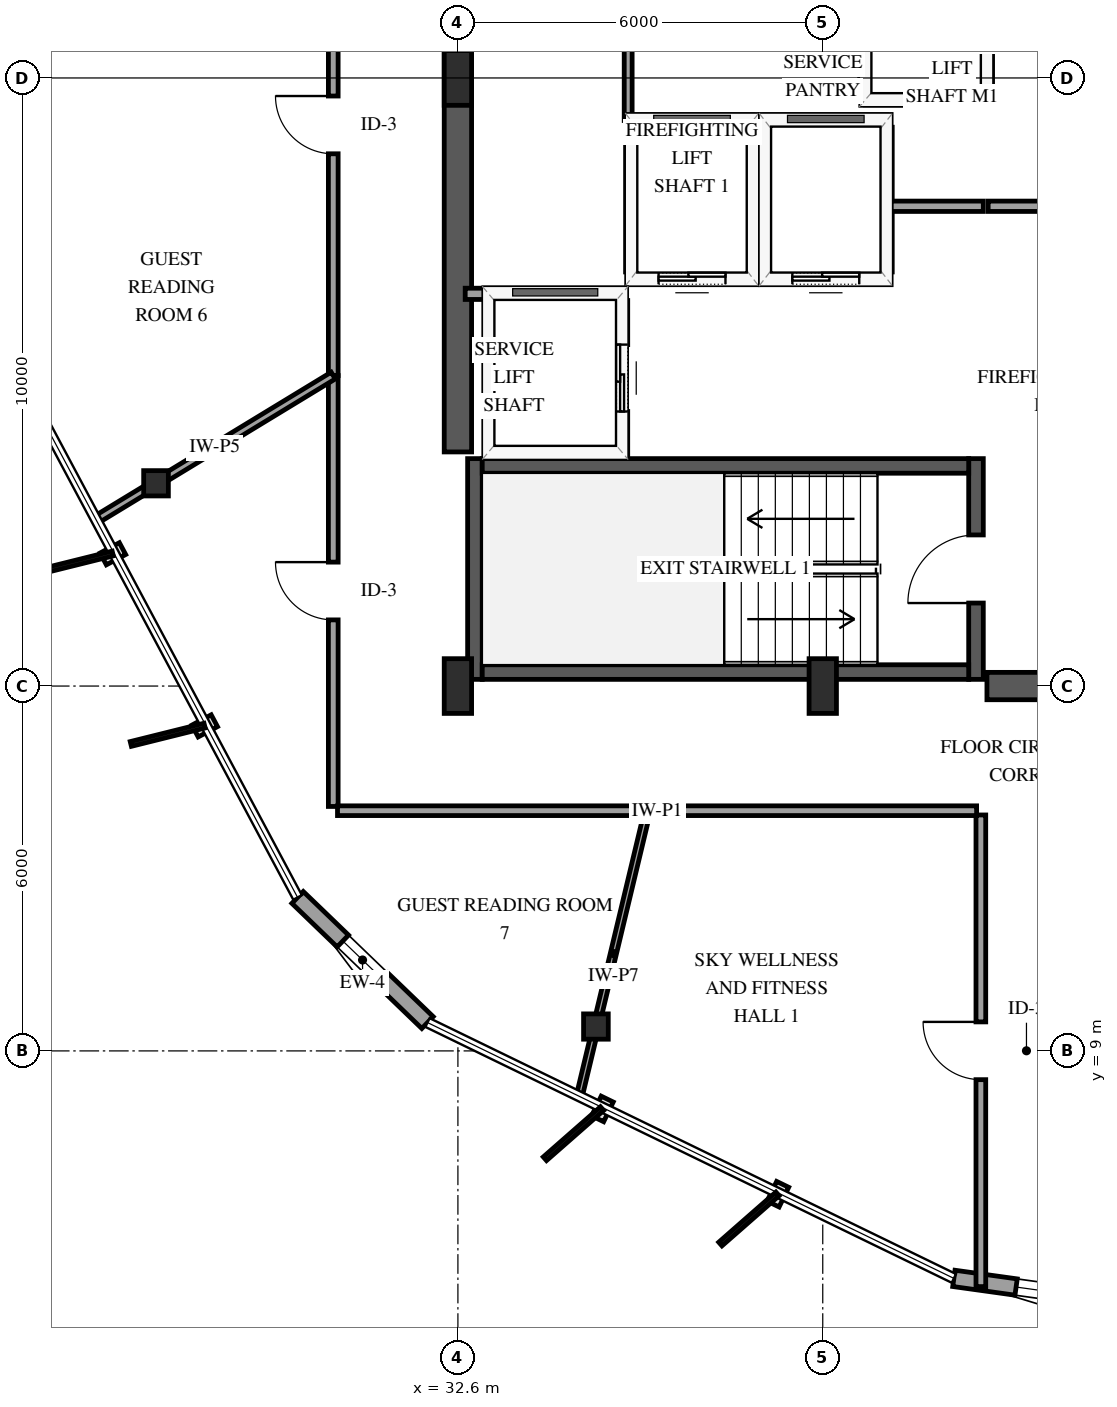
"""IFC4 building model, lengths in metres.
Left out: names, types, materials, properties, quantities, classifications, styles, units other than length and angle.
Written with IfcOpenShell. Run it as: python <this file> out.ifc"""

import sys

from ifc_helpers import new_model, si_unit, direction, frame, frame_2d, origin, origin_2d, place, context, subcontext, project, spatial, rectangle, i_section, extrude, element, fill, save


model = new_model("IFC4")
c1 = context("Model", 3, precision=1e-05, world=origin(), true_north=direction((0.0, 1.0)))
c2 = subcontext(c1, "Body", "Model", "MODEL_VIEW")
j1 = project(units=[si_unit("LENGTHUNIT", "METRE"), si_unit("PLANEANGLEUNIT", "RADIAN")], contexts=[c1])
p1 = place(None, origin())
s1 = spatial("IfcSite", under=j1, at=p1, CompositionType="ELEMENT")
p2 = place(p1, origin())
s2 = spatial("IfcBuilding", under=s1, at=p2, CompositionType="ELEMENT")
p3 = place(p2, frame((0.0, 0.0, 205.0)))
s3 = spatial("IfcBuildingStorey", under=s2, at=p3, CompositionType="ELEMENT", Elevation=205.0)
p4 = place(p3, frame((32.88, 15.11, 0.0), z_axis=(0.0, 0.0, 1.0), x_axis=(0.0, 1.0, 0.0)))
e1 = element("IfcWall", 1, at=p4, inside=s3, PredefinedType="SHEAR", context=c2, shape_type="SweptSolid", body=[
    extrude(rectangle(XDim=3.63, YDim=0.24, at=frame_2d((1.815, 0.0))), origin(), (0.0, 0.0, 1.0), 3.6),
])
p5 = place(p3, frame((41.12, 15.11, 0.0), z_axis=(0.0, 0.0, 1.0), x_axis=(0.0, 1.0, 0.0)))
e2 = element("IfcWall", 2, at=p5, inside=s3, PredefinedType="SHEAR", context=c2, shape_type="SweptSolid", body=[
    extrude(rectangle(XDim=3.63, YDim=0.24, at=frame_2d((1.815, 0.0))), origin(), (0.0, 0.0, 1.0), 3.6),
])
p6 = place(p5, frame((1.255, 0.0, 0.0)))
e3 = element("IfcOpeningElement", 3, at=p6, cuts=e2, PredefinedType="OPENING", context=c2, shape_type="SweptSolid", body=[
    extrude(rectangle(XDim=1.12, YDim=2.15, at=frame_2d((0.56, 1.075))), frame((0.0, 0.13, 0.0), z_axis=(0.0, -1.0, 0.0), x_axis=(1.0, 0.0, 0.0)), (0.0, 0.0, 1.0), 0.26),
])
for number, where, z_axis, x_axis in (
    (4, (33.0, 15.23, 0.0), (0.0, 0.0, 1.0), (1.0, 0.0, 0.0)),
    (5, (33.0, 18.62, 0.0), (0.0, 0.0, 1.0), (1.0, 0.0, 0.0)),
):
    element("IfcWall", number, at=place(p3, frame(where, z_axis=z_axis, x_axis=x_axis)), inside=s3, PredefinedType="SHEAR", context=c2, shape_type="SweptSolid", body=[
        extrude(rectangle(XDim=8.0, YDim=0.24, at=frame_2d((4.0, 0.0))), origin(), (0.0, 0.0, 1.0), 3.6),
    ])
p7 = place(p3, frame((32.6, 18.85, 0.0), z_axis=(0.0, 0.0, 1.0), x_axis=(0.0, 1.0, 0.0)))
e6 = element("IfcWall", 6, at=p7, inside=s3, PredefinedType="SHEAR", context=c2, shape_type="SweptSolid", body=[
    extrude(rectangle(XDim=12.3, YDim=0.45, at=frame_2d((6.15, 0.0))), origin(), (0.0, 0.0, 1.0), 3.6),
])
p8 = place(p3, frame((41.3, 15.0, 0.0), z_axis=(0.0, 0.0, 1.0), x_axis=(1.0, 0.0, 0.0)))
e7 = element("IfcWall", 7, at=p8, inside=s3, PredefinedType="SHEAR", context=c2, shape_type="SweptSolid", body=[
    extrude(rectangle(XDim=2.85, YDim=0.45, at=frame_2d((1.425, 0.0))), origin(), (0.0, 0.0, 1.0), 3.6),
])
for number, where, z_axis, x_axis in (
    (8, (32.6, 15.0, 0.0), (0.0, 0.0, 1.0), (1.0, 0.0, 0.0)),
    (9, (32.6, 25.0, 0.0), (0.0, 0.0, 1.0), (1.0, 0.0, 0.0)),
    (10, (38.6, 15.0, 0.0), (0.0, 0.0, 1.0), (1.0, 0.0, 0.0)),
):
    element("IfcColumn", number, at=place(p3, frame(where, z_axis=z_axis, x_axis=x_axis)), inside=s3, PredefinedType="PILASTER", context=c2, shape_type="SweptSolid", body=[
        extrude(rectangle(XDim=0.45, YDim=0.9, at=origin_2d()), origin(), (0.0, 0.0, 1.0), 3.6),
    ])
for number, where, z_axis, x_axis in (
    (11, (27.635, 18.334, 0.0), (0.0, 0.0, 1.0), (1.0, 0.0, 0.0)),
    (12, (34.87, 9.401, 0.0), (0.0, 0.0, 1.0), (1.0, 0.0, 0.0)),
):
    element("IfcColumn", number, at=place(p3, frame(where, z_axis=z_axis, x_axis=x_axis)), inside=s3, PredefinedType="COLUMN", context=c2, shape_type="SweptSolid", body=[
        extrude(i_section(OverallWidth=0.406, OverallDepth=0.416, WebThickness=0.03, FlangeThickness=0.048, FilletRadius=0.038, at=origin_2d()), origin(), (0.0, 0.0, 1.0), 3.6),
    ])
p9 = place(p3, frame((26.24, 32.468, 0.0), z_axis=(0.0, 0.0, 1.0), x_axis=(-0.137794425401, -0.990460850477, 0.0)))
e13 = element("IfcWall", 13, at=p9, inside=s3, PredefinedType="SOLIDWALL", context=c2, shape_type="SweptSolid", body=[
    extrude(rectangle(XDim=9.624, YDim=0.23, at=frame_2d((4.812, 0.0))), origin(), (0.0, 0.0, 1.0), 2.679),
])
p10 = place(p9, frame((4.312, 0.0, 0.0)))
e14 = element("IfcOpeningElement", 14, at=p10, cuts=e13, PredefinedType="OPENING", context=c2, shape_type="SweptSolid", body=[
    extrude(rectangle(XDim=1.0, YDim=2.15, at=frame_2d((0.5, 1.075))), frame((0.0, 0.125, 0.0), z_axis=(0.0, -1.0, 0.0), x_axis=(1.0, 0.0, 0.0)), (0.0, 0.0, 1.0), 0.25),
])
p11 = place(p9, frame((0.44, 0.0, 0.72)))
e15 = element("IfcOpeningElement", 15, at=p11, cuts=e13, PredefinedType="OPENING", context=c2, shape_type="SweptSolid", body=[
    extrude(rectangle(XDim=1.35, YDim=1.65, at=frame_2d((0.675, 0.825))), frame((0.0, 0.125, 0.0), z_axis=(0.0, -1.0, 0.0), x_axis=(1.0, 0.0, 0.0)), (0.0, 0.0, 1.0), 0.25),
])
p12 = place(p9, frame((5.952, 0.0, 0.72)))
e16 = element("IfcOpeningElement", 16, at=p12, cuts=e13, PredefinedType="OPENING", context=c2, shape_type="SweptSolid", body=[
    extrude(rectangle(XDim=1.35, YDim=1.65, at=frame_2d((0.675, 0.825))), frame((0.0, 0.125, 0.0), z_axis=(0.0, -1.0, 0.0), x_axis=(1.0, 0.0, 0.0)), (0.0, 0.0, 1.0), 0.25),
])
p13 = place(p3, frame((29.963, 11.524, 0.0), z_axis=(0.0, 0.0, 1.0), x_axis=(0.720273000242, -0.69369071287, 0.0)))
e17 = element("IfcWall", 17, at=p13, inside=s3, PredefinedType="SOLIDWALL", context=c2, shape_type="SweptSolid", body=[
    extrude(rectangle(XDim=2.967, YDim=0.27, at=frame_2d((1.483, 0.0))), origin(), (0.0, 0.0, 1.0), 2.679),
])
p14 = place(p13, frame((1.033, 0.0, 0.75)))
e18 = element("IfcOpeningElement", 18, at=p14, cuts=e17, PredefinedType="OPENING", context=c2, shape_type="SweptSolid", body=[
    extrude(rectangle(XDim=0.9, YDim=1.5, at=frame_2d((0.45, 0.75))), frame((0.0, 0.145, 0.0), z_axis=(0.0, -1.0, 0.0), x_axis=(1.0, 0.0, 0.0)), (0.0, 0.0, 1.0), 0.29),
])
p15 = place(p3, frame((40.756, 5.259, 0.0), z_axis=(0.0, 0.0, 1.0), x_axis=(0.990464529439, -0.137767978586, 0.0)))
e19 = element("IfcWall", 19, at=p15, inside=s3, PredefinedType="SOLIDWALL", context=c2, shape_type="SweptSolid", body=[
    extrude(rectangle(XDim=2.967, YDim=0.27, at=frame_2d((1.483, 0.0))), origin(), (0.0, 0.0, 1.0), 2.679),
])
p16 = place(p15, frame((1.033, 0.0, 0.75)))
e20 = element("IfcOpeningElement", 20, at=p16, cuts=e19, PredefinedType="OPENING", context=c2, shape_type="SweptSolid", body=[
    extrude(rectangle(XDim=0.9, YDim=1.5, at=frame_2d((0.45, 0.75))), frame((0.0, 0.145, 0.0), z_axis=(0.0, -1.0, 0.0), x_axis=(1.0, 0.0, 0.0)), (0.0, 0.0, 1.0), 0.29),
])
p17 = place(p3, frame((35.45, 21.7, 0.0), z_axis=(0.0, 0.0, 1.0), x_axis=(1.0, 0.0, 0.0)))
e21 = element("IfcWall", 21, at=p17, inside=s3, PredefinedType="SOLIDWALL", context=c2, shape_type="SweptSolid", body=[
    extrude(rectangle(XDim=2.0, YDim=0.185, at=frame_2d((1.0, 0.0))), origin(), (0.0, 0.0, 1.0), 3.3),
])
p18 = place(p17, frame((0.45, 0.0, 0.0)))
e22 = element("IfcOpeningElement", 22, at=p18, cuts=e21, PredefinedType="OPENING", context=c2, shape_type="SweptSolid", body=[
    extrude(rectangle(XDim=1.1, YDim=2.15, at=frame_2d((0.55, 1.075))), frame((0.0, 0.103, 0.0), z_axis=(0.0, -1.0, 0.0), x_axis=(1.0, 0.0, 0.0)), (0.0, 0.0, 1.0), 0.205),
])
p19 = place(p3, frame((35.45, 24.3, 0.0), z_axis=(0.0, 0.0, 1.0), x_axis=(1.0, 0.0, 0.0)))
e23 = element("IfcWall", 23, at=p19, inside=s3, PredefinedType="SOLIDWALL", context=c2, shape_type="SweptSolid", body=[
    extrude(rectangle(XDim=2.0, YDim=0.185, at=frame_2d((1.0, 0.0))), origin(), (0.0, 0.0, 1.0), 3.3),
])
for number, where, z_axis, x_axis in (
    (24, (35.45, 21.81, 0.0), (0.0, 0.0, 1.0), (0.0, 1.0, 0.0)),
    (25, (37.45, 21.81, 0.0), (0.0, 0.0, 1.0), (0.0, 1.0, 0.0)),
):
    element("IfcWall", number, at=place(p3, frame(where, z_axis=z_axis, x_axis=x_axis)), inside=s3, PredefinedType="SOLIDWALL", context=c2, shape_type="SweptSolid", body=[
        extrude(rectangle(XDim=2.38, YDim=0.185, at=frame_2d((1.19, 0.0))), origin(), (0.0, 0.0, 1.0), 3.3),
    ])
p20 = place(p3, frame((37.65, 21.7, 0.0), z_axis=(0.0, 0.0, 1.0), x_axis=(1.0, 0.0, 0.0)))
e26 = element("IfcWall", 26, at=p20, inside=s3, PredefinedType="SOLIDWALL", context=c2, shape_type="SweptSolid", body=[
    extrude(rectangle(XDim=2.0, YDim=0.185, at=frame_2d((1.0, 0.0))), origin(), (0.0, 0.0, 1.0), 3.3),
])
p21 = place(p20, frame((0.45, 0.0, 0.0)))
e27 = element("IfcOpeningElement", 27, at=p21, cuts=e26, PredefinedType="OPENING", context=c2, shape_type="SweptSolid", body=[
    extrude(rectangle(XDim=1.1, YDim=2.15, at=frame_2d((0.55, 1.075))), frame((0.0, 0.103, 0.0), z_axis=(0.0, -1.0, 0.0), x_axis=(1.0, 0.0, 0.0)), (0.0, 0.0, 1.0), 0.205),
])
p22 = place(p3, frame((37.65, 24.3, 0.0), z_axis=(0.0, 0.0, 1.0), x_axis=(1.0, 0.0, 0.0)))
e28 = element("IfcWall", 28, at=p22, inside=s3, PredefinedType="SOLIDWALL", context=c2, shape_type="SweptSolid", body=[
    extrude(rectangle(XDim=2.0, YDim=0.185, at=frame_2d((1.0, 0.0))), origin(), (0.0, 0.0, 1.0), 3.3),
])
p23 = place(p3, frame((39.65, 21.81, 0.0), z_axis=(0.0, 0.0, 1.0), x_axis=(0.0, 1.0, 0.0)))
e29 = element("IfcWall", 29, at=p23, inside=s3, PredefinedType="SOLIDWALL", context=c2, shape_type="SweptSolid", body=[
    extrude(rectangle(XDim=2.38, YDim=0.185, at=frame_2d((1.19, 0.0))), origin(), (0.0, 0.0, 1.0), 3.3),
])
p24 = place(p3, frame((32.72, 21.45, 0.0), z_axis=(0.0, 0.0, 1.0), x_axis=(1.0, 0.0, 0.0)))
e30 = element("IfcWall", 30, at=p24, inside=s3, PredefinedType="SOLIDWALL", context=c2, shape_type="SweptSolid", body=[
    extrude(rectangle(XDim=2.58, YDim=0.185, at=frame_2d((1.29, 0.0))), origin(), (0.0, 0.0, 1.0), 3.3),
])
p25 = place(p3, frame((35.3, 18.79, 0.0), z_axis=(0.0, 0.0, 1.0), x_axis=(0.0, 1.0, 0.0)))
e31 = element("IfcWall", 31, at=p25, inside=s3, PredefinedType="SOLIDWALL", context=c2, shape_type="SweptSolid", body=[
    extrude(rectangle(XDim=2.55, YDim=0.185, at=frame_2d((1.275, 0.0))), origin(), (0.0, 0.0, 1.0), 3.3),
])
p26 = place(p25, frame((0.725, 0.0, 0.0)))
e32 = element("IfcOpeningElement", 32, at=p26, cuts=e31, PredefinedType="OPENING", context=c2, shape_type="SweptSolid", body=[
    extrude(rectangle(XDim=1.1, YDim=2.15, at=frame_2d((0.55, 1.075))), frame((0.0, 0.103, 0.0), z_axis=(0.0, -1.0, 0.0), x_axis=(1.0, 0.0, 0.0)), (0.0, 0.0, 1.0), 0.205),
])
p27 = place(p3, frame((39.3, 24.65, 0.0), z_axis=(0.0, 0.0, 1.0), x_axis=(1.0, 0.0, 0.0)))
e33 = element("IfcWall", 33, at=p27, inside=s3, PredefinedType="SOLIDWALL", context=c2, shape_type="SweptSolid", body=[
    extrude(rectangle(XDim=2.0, YDim=0.185, at=frame_2d((1.0, 0.0))), origin(), (0.0, 0.0, 1.0), 3.3),
])
for number, where, z_axis, x_axis in (
    (34, (39.3, 24.76, 0.0), (0.0, 0.0, 1.0), (0.0, 1.0, 0.0)),
    (35, (41.3, 24.76, 0.0), (0.0, 0.0, 1.0), (0.0, 1.0, 0.0)),
):
    element("IfcWall", number, at=place(p3, frame(where, z_axis=z_axis, x_axis=x_axis)), inside=s3, PredefinedType="SOLIDWALL", context=c2, shape_type="SweptSolid", body=[
        extrude(rectangle(XDim=2.08, YDim=0.185, at=frame_2d((1.04, 0.0))), origin(), (0.0, 0.0, 1.0), 3.3),
    ])
p28 = place(p3, frame((30.55, 20.106, 0.0), z_axis=(0.0, 0.0, 1.0), x_axis=(0.0, 1.0, 0.0)))
e36 = element("IfcWall", 36, at=p28, inside=s3, PredefinedType="PARTITIONING", context=c2, shape_type="SweptSolid", body=[
    extrude(rectangle(XDim=8.245, YDim=0.16, at=frame_2d((4.123, 0.0))), origin(), (0.0, 0.0, 1.0), 3.3),
])
p29 = place(p28, frame((3.647, 0.0, 0.0)))
e37 = element("IfcOpeningElement", 37, at=p29, cuts=e36, PredefinedType="OPENING", context=c2, shape_type="SweptSolid", body=[
    extrude(rectangle(XDim=0.95, YDim=2.15, at=frame_2d((0.475, 1.075))), frame((0.0, 0.09, 0.0), z_axis=(0.0, -1.0, 0.0), x_axis=(1.0, 0.0, 0.0)), (0.0, 0.0, 1.0), 0.18),
])
p30 = place(p3, frame((41.2, 5.124, 0.0), z_axis=(0.0, 0.0, 1.0), x_axis=(0.0, 1.0, 0.0)))
e38 = element("IfcWall", 38, at=p30, inside=s3, PredefinedType="PARTITIONING", context=c2, shape_type="SweptSolid", body=[
    extrude(rectangle(XDim=7.756, YDim=0.16, at=frame_2d((3.878, 0.0))), origin(), (0.0, 0.0, 1.0), 3.3),
])
p31 = place(p30, frame((3.403, 0.0, 0.0)))
e39 = element("IfcOpeningElement", 39, at=p31, cuts=e38, PredefinedType="OPENING", context=c2, shape_type="SweptSolid", body=[
    extrude(rectangle(XDim=0.95, YDim=2.15, at=frame_2d((0.475, 1.075))), frame((0.0, 0.09, 0.0), z_axis=(0.0, -1.0, 0.0), x_axis=(1.0, 0.0, 0.0)), (0.0, 0.0, 1.0), 0.18),
])
p32 = place(p3, frame((30.55, 13.02, 0.0), z_axis=(0.0, 0.0, 1.0), x_axis=(0.0, 1.0, 0.0)))
e40 = element("IfcWall", 40, at=p32, inside=s3, PredefinedType="PARTITIONING", context=c2, shape_type="SweptSolid", body=[
    extrude(rectangle(XDim=7.086, YDim=0.16, at=frame_2d((3.543, 0.0))), origin(), (0.0, 0.0, 1.0), 3.3),
])
p33 = place(p32, frame((3.068, 0.0, 0.0)))
e41 = element("IfcOpeningElement", 41, at=p33, cuts=e40, PredefinedType="OPENING", context=c2, shape_type="SweptSolid", body=[
    extrude(rectangle(XDim=0.95, YDim=2.15, at=frame_2d((0.475, 1.075))), frame((0.0, 0.09, 0.0), z_axis=(0.0, -1.0, 0.0), x_axis=(1.0, 0.0, 0.0)), (0.0, 0.0, 1.0), 0.18),
])
p34 = place(p3, frame((41.13, 12.95, 0.0), z_axis=(0.0, 0.0, 1.0), x_axis=(-1.0, 0.0, 0.0)))
e42 = element("IfcWall", 42, at=p34, inside=s3, PredefinedType="PARTITIONING", context=c2, shape_type="SweptSolid", body=[
    extrude(rectangle(XDim=5.411, YDim=0.16, at=frame_2d((2.706, 0.0))), origin(), (0.0, 0.0, 1.0), 3.3),
])
p35 = place(p3, frame((35.719, 12.95, 0.0), z_axis=(0.0, 0.0, 1.0), x_axis=(-1.0, 0.0, 0.0)))
e43 = element("IfcWall", 43, at=p35, inside=s3, PredefinedType="PARTITIONING", context=c2, shape_type="SweptSolid", body=[
    extrude(rectangle(XDim=5.099, YDim=0.16, at=frame_2d((2.549, 0.0))), origin(), (0.0, 0.0, 1.0), 3.3),
])
p36 = place(p3, frame((35.719, 12.95, 0.0), z_axis=(0.0, 0.0, 1.0), x_axis=(-0.232734329743, -0.972540349682, 0.0)))
e44 = element("IfcWall", 44, at=p36, inside=s3, PredefinedType="PARTITIONING", context=c2, shape_type="SweptSolid", body=[
    extrude(rectangle(XDim=4.83, YDim=0.1, at=frame_2d((2.415, 0.0))), origin(), (0.0, 0.0, 1.0), 2.595),
])
p37 = place(p3, frame((30.55, 20.106, 0.0), z_axis=(0.0, 0.0, 1.0), x_axis=(-0.85450518218, -0.519442868492, 0.0)))
e45 = element("IfcWall", 45, at=p37, inside=s3, PredefinedType="PARTITIONING", context=c2, shape_type="SweptSolid", body=[
    extrude(rectangle(XDim=4.564, YDim=0.13, at=frame_2d((2.282, 0.0))), origin(), (0.0, 0.0, 1.0), 3.3),
])
p38 = place(p3, frame((41.32, 22.89, 0.0), z_axis=(0.0, 0.0, 1.0), x_axis=(1.0, 0.0, 0.0)))
e46 = element("IfcWall", 46, at=p38, inside=s3, PredefinedType="PARTITIONING", context=c2, shape_type="SweptSolid", body=[
    extrude(rectangle(XDim=3.24, YDim=0.17, at=frame_2d((1.62, 0.0))), origin(), (0.0, 0.0, 1.0), 3.3),
])
p39 = place(p38, frame((1.08, 0.0, 0.0)))
e47 = element("IfcOpeningElement", 47, at=p39, cuts=e46, PredefinedType="OPENING", context=c2, shape_type="SweptSolid", body=[
    extrude(rectangle(XDim=1.08, YDim=2.15, at=frame_2d((0.54, 1.075))), frame((0.0, 0.095, 0.0), z_axis=(0.0, -1.0, 0.0), x_axis=(1.0, 0.0, 0.0)), (0.0, 0.0, 1.0), 0.19),
])
p40 = place(p3, frame((35.4, 26.88, 0.0), z_axis=(0.0, 0.0, 1.0), x_axis=(0.0, -1.0, 0.0)))
e48 = element("IfcWall", 48, at=p40, inside=s3, PredefinedType="PARTITIONING", context=c2, shape_type="SweptSolid", body=[
    extrude(rectangle(XDim=2.58, YDim=0.13, at=frame_2d((1.29, 0.0))), origin(), (0.0, 0.0, 1.0), 3.3),
])
p41 = place(p3, frame((39.72, 22.89, 0.0), z_axis=(0.0, 0.0, 1.0), x_axis=(1.0, 0.0, 0.0)))
e49 = element("IfcWall", 49, at=p41, inside=s3, PredefinedType="PARTITIONING", context=c2, shape_type="SweptSolid", body=[
    extrude(rectangle(XDim=1.52, YDim=0.17, at=frame_2d((0.76, 0.0))), origin(), (0.0, 0.0, 1.0), 3.3),
])
p42 = place(p14, origin())
e50 = element("IfcWindow", 50, at=p42, inside=s3, PartitioningType="SINGLE_PANEL", PredefinedType="WINDOW", context=c2, shape_type="SweptSolid", body=[
    extrude(rectangle(XDim=0.9, YDim=1.5, at=frame_2d((0.45, 0.75))), frame((0.0, 0.03, 0.0), z_axis=(0.0, -1.0, 0.0), x_axis=(1.0, 0.0, 0.0)), (0.0, 0.0, 1.0), 0.06),
])
fill(e18, e50)
p43 = place(p16, origin())
e51 = element("IfcWindow", 51, at=p43, inside=s3, PartitioningType="SINGLE_PANEL", PredefinedType="WINDOW", context=c2, shape_type="SweptSolid", body=[
    extrude(rectangle(XDim=0.9, YDim=1.5, at=frame_2d((0.45, 0.75))), frame((0.0, 0.03, 0.0), z_axis=(0.0, -1.0, 0.0), x_axis=(1.0, 0.0, 0.0)), (0.0, 0.0, 1.0), 0.06),
])
fill(e20, e51)
p44 = place(p18, origin())
e52 = element("IfcDoor", 52, at=p44, inside=s3, OperationType="SLIDING_TO_LEFT", PredefinedType="DOOR", context=c2, shape_type="SweptSolid", body=[
    extrude(rectangle(XDim=1.1, YDim=2.15, at=frame_2d((0.55, 1.075))), frame((0.0, 0.025, 0.0), z_axis=(0.0, -1.0, 0.0), x_axis=(1.0, 0.0, 0.0)), (0.0, 0.0, 1.0), 0.05),
])
fill(e22, e52)
p45 = place(p21, origin())
e53 = element("IfcDoor", 53, at=p45, inside=s3, OperationType="SLIDING_TO_LEFT", PredefinedType="DOOR", context=c2, shape_type="SweptSolid", body=[
    extrude(rectangle(XDim=1.1, YDim=2.15, at=frame_2d((0.55, 1.075))), frame((0.0, 0.025, 0.0), z_axis=(0.0, -1.0, 0.0), x_axis=(1.0, 0.0, 0.0)), (0.0, 0.0, 1.0), 0.05),
])
fill(e27, e53)
p46 = place(p26, origin())
e54 = element("IfcDoor", 54, at=p46, inside=s3, OperationType="SLIDING_TO_LEFT", PredefinedType="DOOR", context=c2, shape_type="SweptSolid", body=[
    extrude(rectangle(XDim=1.1, YDim=2.15, at=frame_2d((0.55, 1.075))), frame((0.0, 0.025, 0.0), z_axis=(0.0, -1.0, 0.0), x_axis=(1.0, 0.0, 0.0)), (0.0, 0.0, 1.0), 0.05),
])
fill(e32, e54)
p47 = place(p6, origin())
e55 = element("IfcDoor", 55, at=p47, inside=s3, OperationType="SINGLE_SWING_LEFT", PredefinedType="DOOR", context=c2, shape_type="SweptSolid", body=[
    extrude(rectangle(XDim=1.12, YDim=2.15, at=frame_2d((0.56, 1.075))), frame((0.0, 0.025, 0.0), z_axis=(0.0, -1.0, 0.0), x_axis=(1.0, 0.0, 0.0)), (0.0, 0.0, 1.0), 0.05),
])
fill(e3, e55)
p48 = place(p29, origin())
e56 = element("IfcDoor", 56, at=p48, inside=s3, OperationType="SINGLE_SWING_RIGHT", PredefinedType="DOOR", context=c2, shape_type="SweptSolid", body=[
    extrude(rectangle(XDim=0.95, YDim=2.15, at=frame_2d((0.475, 1.075))), frame((0.0, 0.025, 0.0), z_axis=(0.0, -1.0, 0.0), x_axis=(1.0, 0.0, 0.0)), (0.0, 0.0, 1.0), 0.05),
])
fill(e37, e56)
p49 = place(p31, origin())
e57 = element("IfcDoor", 57, at=p49, inside=s3, OperationType="SINGLE_SWING_RIGHT", PredefinedType="DOOR", context=c2, shape_type="SweptSolid", body=[
    extrude(rectangle(XDim=0.95, YDim=2.15, at=frame_2d((0.475, 1.075))), frame((0.0, 0.025, 0.0), z_axis=(0.0, -1.0, 0.0), x_axis=(1.0, 0.0, 0.0)), (0.0, 0.0, 1.0), 0.05),
])
fill(e39, e57)
p50 = place(p33, origin())
e58 = element("IfcDoor", 58, at=p50, inside=s3, OperationType="SINGLE_SWING_RIGHT", PredefinedType="DOOR", context=c2, shape_type="SweptSolid", body=[
    extrude(rectangle(XDim=0.95, YDim=2.15, at=frame_2d((0.475, 1.075))), frame((0.0, 0.025, 0.0), z_axis=(0.0, -1.0, 0.0), x_axis=(1.0, 0.0, 0.0)), (0.0, 0.0, 1.0), 0.05),
])
fill(e41, e58)
save(model, sys.argv[1])
